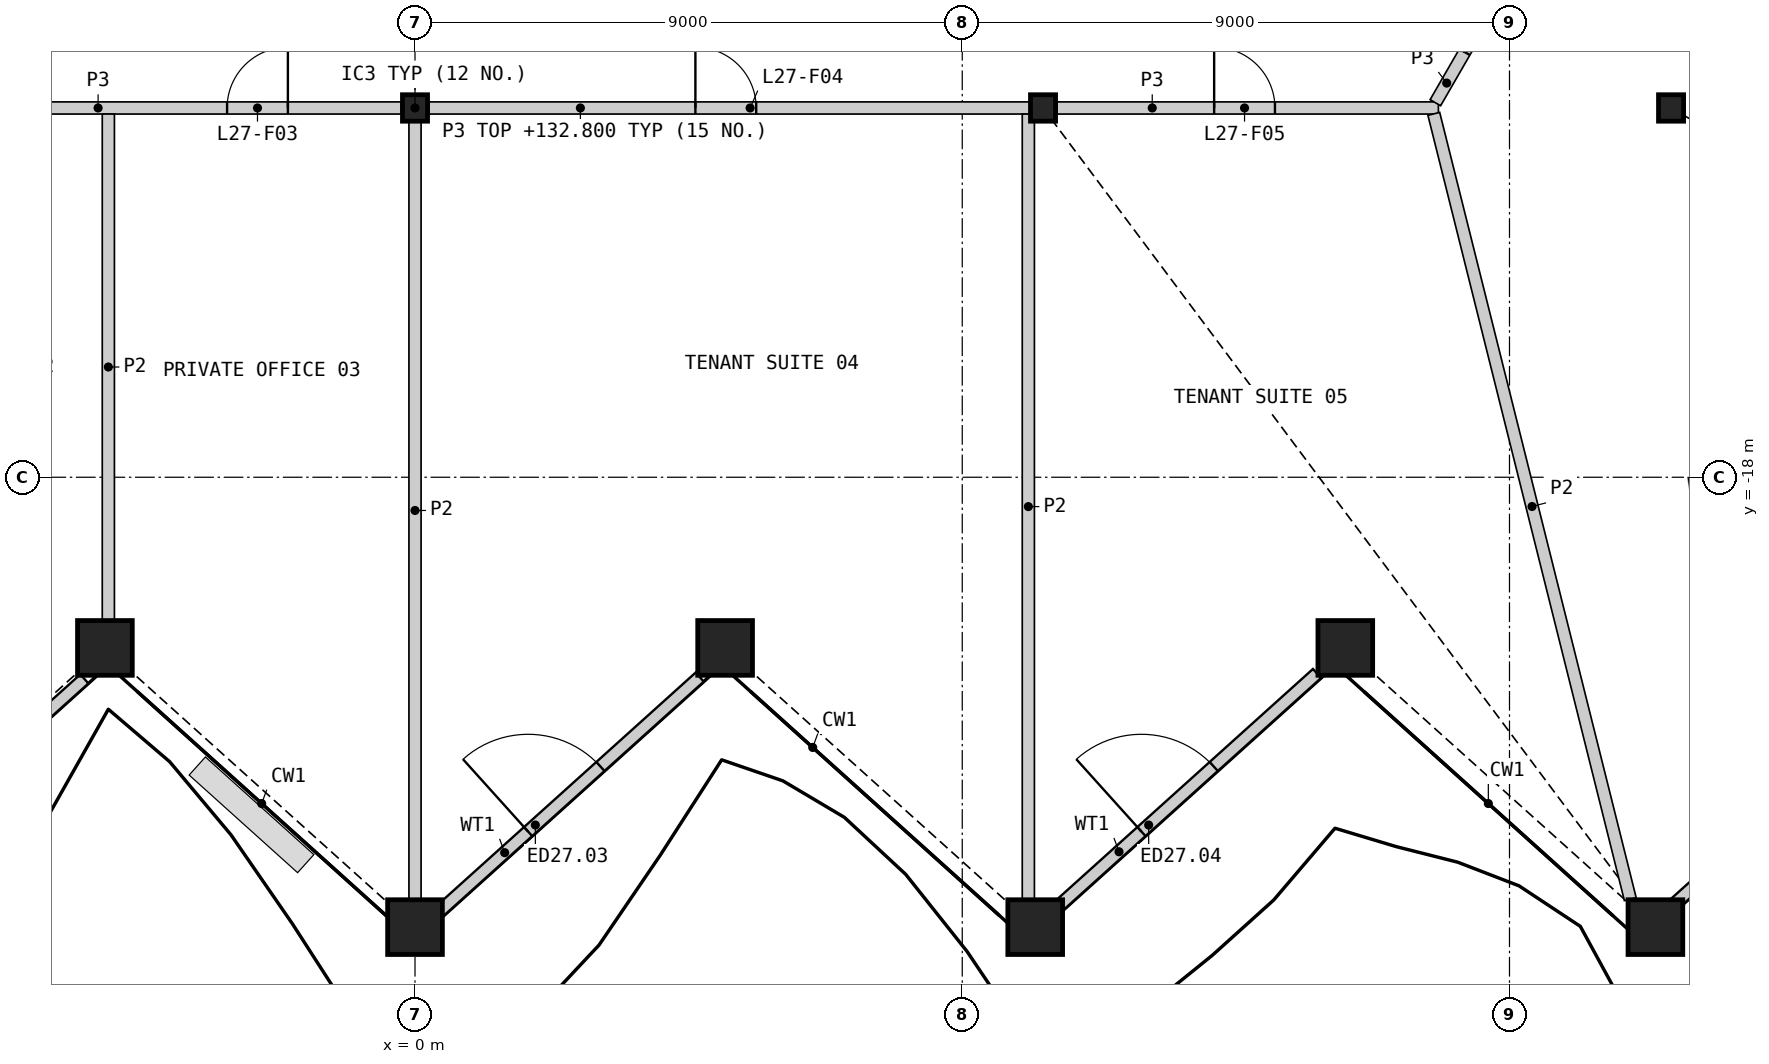
"""IFC4 building model, lengths in metres.
Left out: names, types, materials, properties, quantities, classifications, styles, units other than length and angle.
Written with IfcOpenShell. Run it as: python <this file> out.ifc"""

import sys

from ifc_helpers import new_model, si_unit, direction, frame, frame_2d, origin, origin_2d, place, context, subcontext, project, spatial, rectangle, hollow_rectangle, i_section, extrude, element, fill, save


model = new_model("IFC4")
c1 = context("Model", 3, precision=1e-05, world=origin(), true_north=direction((0.0, 1.0)))
c2 = subcontext(c1, "Body", "Model", "MODEL_VIEW")
j1 = project(units=[si_unit("LENGTHUNIT", "METRE"), si_unit("PLANEANGLEUNIT", "RADIAN")], contexts=[c1])
p1 = place(None, origin())
s1 = spatial("IfcSite", under=j1, at=p1, CompositionType="ELEMENT")
p2 = place(p1, origin())
s2 = spatial("IfcBuilding", under=s1, at=p2, CompositionType="ELEMENT")
p3 = place(p2, frame((0.0, 0.0, 129.0)))
s3 = spatial("IfcBuildingStorey", under=s2, at=p3, CompositionType="ELEMENT", Elevation=129.0)
for number, where, z_axis, x_axis in (
    (1, (-5.1, -20.807, 0.0), (0.0, 0.0, 1.0), (1.0, 0.0, 0.0)),
    (2, (0.0, -25.399, 0.0), (0.0, 0.0, 1.0), (1.0, 0.0, 0.0)),
    (3, (5.1, -20.807, 0.0), (0.0, 0.0, 1.0), (1.0, 0.0, 0.0)),
    (4, (10.2, -25.399, 0.0), (0.0, 0.0, 1.0), (1.0, 0.0, 0.0)),
    (5, (15.3, -20.807, 0.0), (0.0, 0.0, 1.0), (1.0, 0.0, 0.0)),
    (6, (20.4, -25.399, 0.0), (0.0, 0.0, 1.0), (1.0, 0.0, 0.0)),
):
    element("IfcColumn", number, at=place(p3, frame(where, z_axis=z_axis, x_axis=x_axis)), inside=s3, PredefinedType="COLUMN", context=c2, shape_type="SweptSolid", body=[
        extrude(hollow_rectangle(XDim=0.9, YDim=0.9, WallThickness=0.06, at=origin_2d()), origin(), (0.0, 0.0, 1.0), 4.2),
    ])
for number, where, z_axis, x_axis in (
    (7, (0.0, -11.926, 0.0), (0.0, 0.0, 1.0), (1.0, 0.0, 0.0)),
    (8, (10.328, -11.926, 0.0), (0.0, 0.0, 1.0), (1.0, 0.0, 0.0)),
    (9, (20.657, -11.926, 0.0), (0.0, 0.0, 1.0), (1.0, 0.0, 0.0)),
):
    element("IfcColumn", number, at=place(p3, frame(where, z_axis=z_axis, x_axis=x_axis)), inside=s3, PredefinedType="COLUMN", context=c2, shape_type="SweptSolid", body=[
        extrude(i_section(OverallWidth=0.412, OverallDepth=0.435, WebThickness=0.036, FlangeThickness=0.057, at=origin_2d()), origin(), (0.0, 0.0, 1.0), 4.2),
    ])
p4 = place(p3, frame((-9.696, -25.151, 0.0), z_axis=(0.0, 0.0, 1.0), x_axis=(0.743141591148, 0.669134198428, 0.0)))
e10 = element("IfcWall", 10, at=p4, inside=s3, PredefinedType="SOLIDWALL", context=c2, shape_type="SweptSolid", body=[
    extrude(rectangle(XDim=5.73, YDim=0.2, at=frame_2d((2.865, 0.0))), origin(), (0.0, 0.0, 1.0), 3.189),
])
p5 = place(p4, frame((1.978, 0.0, 0.0)))
e11 = element("IfcOpeningElement", 11, at=p5, cuts=e10, PredefinedType="OPENING", context=c2, shape_type="SweptSolid", body=[
    extrude(rectangle(XDim=1.6, YDim=2.4, at=frame_2d((0.8, 1.2))), frame((0.0, 0.11, 0.0), z_axis=(0.0, -1.0, 0.0), x_axis=(1.0, 0.0, 0.0)), (0.0, 0.0, 1.0), 0.22),
])
p6 = place(p3, frame((0.406, -25.137, 0.0), z_axis=(0.0, 0.0, 1.0), x_axis=(0.743135897471, 0.669140521782, 0.0)))
e12 = element("IfcWall", 12, at=p6, inside=s3, PredefinedType="SOLIDWALL", context=c2, shape_type="SweptSolid", body=[
    extrude(rectangle(XDim=5.754, YDim=0.2, at=frame_2d((2.877, 0.0))), origin(), (0.0, 0.0, 1.0), 3.189),
])
p7 = place(p6, frame((1.957, 0.0, 0.0)))
e13 = element("IfcOpeningElement", 13, at=p7, cuts=e12, PredefinedType="OPENING", context=c2, shape_type="SweptSolid", body=[
    extrude(rectangle(XDim=1.6, YDim=2.4, at=frame_2d((0.8, 1.2))), frame((0.0, 0.11, 0.0), z_axis=(0.0, -1.0, 0.0), x_axis=(1.0, 0.0, 0.0)), (0.0, 0.0, 1.0), 0.22),
])
p8 = place(p3, frame((10.492, -25.137, 0.0), z_axis=(0.0, 0.0, 1.0), x_axis=(0.743136230799, 0.669140151593, 0.0)))
e14 = element("IfcWall", 14, at=p8, inside=s3, PredefinedType="SOLIDWALL", context=c2, shape_type="SweptSolid", body=[
    extrude(rectangle(XDim=5.843, YDim=0.2, at=frame_2d((2.922, 0.0))), origin(), (0.0, 0.0, 1.0), 3.189),
])
p9 = place(p8, frame((1.957, 0.0, 0.0)))
e15 = element("IfcOpeningElement", 15, at=p9, cuts=e14, PredefinedType="OPENING", context=c2, shape_type="SweptSolid", body=[
    extrude(rectangle(XDim=1.6, YDim=2.4, at=frame_2d((0.8, 1.2))), frame((0.0, 0.11, 0.0), z_axis=(0.0, -1.0, 0.0), x_axis=(1.0, 0.0, 0.0)), (0.0, 0.0, 1.0), 0.22),
])
p10 = place(p3, frame((20.579, -25.137, 0.0), z_axis=(0.0, 0.0, 1.0), x_axis=(0.743148838472, 0.66912614945, 0.0)))
e16 = element("IfcWall", 16, at=p10, inside=s3, PredefinedType="SOLIDWALL", context=c2, shape_type="SweptSolid", body=[
    extrude(rectangle(XDim=5.515, YDim=0.2, at=frame_2d((2.757, 0.0))), origin(), (0.0, 0.0, 1.0), 3.189),
])
p11 = place(p10, frame((1.957, 0.0, 0.0)))
e17 = element("IfcOpeningElement", 17, at=p11, cuts=e16, PredefinedType="OPENING", context=c2, shape_type="SweptSolid", body=[
    extrude(rectangle(XDim=1.6, YDim=2.4, at=frame_2d((0.8, 1.2))), frame((0.0, 0.11, 0.0), z_axis=(0.0, -1.0, 0.0), x_axis=(1.0, 0.0, 0.0)), (0.0, 0.0, 1.0), 0.22),
])
p12 = place(p3, frame((0.227, -11.926, 0.0), z_axis=(0.0, 0.0, 1.0), x_axis=(1.0, 0.0, 0.0)))
e18 = element("IfcWall", 18, at=p12, inside=s3, PredefinedType="PARTITIONING", context=c2, shape_type="SweptSolid", body=[
    extrude(rectangle(XDim=9.969, YDim=0.2, at=frame_2d((4.985, 0.0))), origin(), (0.0, 0.0, 1.0), 3.8),
])
p13 = place(p12, frame((4.384, 0.0, 0.0)))
e19 = element("IfcOpeningElement", 19, at=p13, cuts=e18, PredefinedType="OPENING", context=c2, shape_type="SweptSolid", body=[
    extrude(rectangle(XDim=1.0, YDim=2.1, at=frame_2d((0.5, 1.05))), frame((0.0, 0.11, 0.0), z_axis=(0.0, -1.0, 0.0), x_axis=(1.0, 0.0, 0.0)), (0.0, 0.0, 1.0), 0.22),
])
p14 = place(p3, frame((-10.197, -11.926, 0.0), z_axis=(0.0, 0.0, 1.0), x_axis=(1.0, 0.0, 0.0)))
e20 = element("IfcWall", 20, at=p14, inside=s3, PredefinedType="PARTITIONING", context=c2, shape_type="SweptSolid", body=[
    extrude(rectangle(XDim=9.969, YDim=0.2, at=frame_2d((4.985, 0.0))), origin(), (0.0, 0.0, 1.0), 3.8),
])
p15 = place(p14, frame((2.166, 0.0, 0.0)))
e21 = element("IfcOpeningElement", 21, at=p15, cuts=e20, PredefinedType="OPENING", context=c2, shape_type="SweptSolid", body=[
    extrude(rectangle(XDim=1.0, YDim=2.1, at=frame_2d((0.5, 1.05))), frame((0.0, 0.11, 0.0), z_axis=(0.0, -1.0, 0.0), x_axis=(1.0, 0.0, 0.0)), (0.0, 0.0, 1.0), 0.22),
])
p16 = place(p14, frame((7.106, 0.0, 0.0)))
e22 = element("IfcOpeningElement", 22, at=p16, cuts=e20, PredefinedType="OPENING", context=c2, shape_type="SweptSolid", body=[
    extrude(rectangle(XDim=1.0, YDim=2.1, at=frame_2d((0.5, 1.05))), frame((0.0, 0.11, 0.0), z_axis=(0.0, -1.0, 0.0), x_axis=(1.0, 0.0, 0.0)), (0.0, 0.0, 1.0), 0.22),
])
p17 = place(p3, frame((10.556, -11.926, 0.0), z_axis=(0.0, 0.0, 1.0), x_axis=(1.0, 0.0, 0.0)))
e23 = element("IfcWall", 23, at=p17, inside=s3, PredefinedType="PARTITIONING", context=c2, shape_type="SweptSolid", body=[
    extrude(rectangle(XDim=6.275, YDim=0.2, at=frame_2d((3.137, 0.0))), origin(), (0.0, 0.0, 1.0), 3.8),
])
p18 = place(p17, frame((2.587, 0.0, 0.0)))
e24 = element("IfcOpeningElement", 24, at=p18, cuts=e23, PredefinedType="OPENING", context=c2, shape_type="SweptSolid", body=[
    extrude(rectangle(XDim=1.0, YDim=2.1, at=frame_2d((0.5, 1.05))), frame((0.0, 0.11, 0.0), z_axis=(0.0, -1.0, 0.0), x_axis=(1.0, 0.0, 0.0)), (0.0, 0.0, 1.0), 0.22),
])
p19 = place(p3, frame((16.781, -11.84, 0.0), z_axis=(0.0, 0.0, 1.0), x_axis=(0.499958791762, 0.866049194065, 0.0)))
e25 = element("IfcWall", 25, at=p19, inside=s3, PredefinedType="PARTITIONING", context=c2, shape_type="SweptSolid", body=[
    extrude(rectangle(XDim=3.726, YDim=0.2, at=frame_2d((1.863, 0.0))), origin(), (0.0, 0.0, 1.0), 3.8),
])
p20 = place(p19, frame((0.963, 0.0, 0.0)))
e26 = element("IfcOpeningElement", 26, at=p20, cuts=e25, PredefinedType="OPENING", context=c2, shape_type="SweptSolid", body=[
    extrude(rectangle(XDim=1.8, YDim=2.1, at=frame_2d((0.9, 1.05))), frame((0.0, 0.11, 0.0), z_axis=(0.0, -1.0, 0.0), x_axis=(1.0, 0.0, 0.0)), (0.0, 0.0, 1.0), 0.22),
])
p21 = place(p3, frame((16.755, -12.023, 0.0), z_axis=(0.0, 0.0, 1.0), x_axis=(0.242708204495, -0.97009933897, 0.0)))
e27 = element("IfcWall", 27, at=p21, inside=s3, PredefinedType="PARTITIONING", context=c2, shape_type="SweptSolid", body=[
    extrude(rectangle(XDim=13.314, YDim=0.2, at=frame_2d((6.657, 0.0))), origin(), (0.0, 0.0, 1.0), 2.885),
])
p22 = place(p3, frame((10.087, -24.939, 0.0), z_axis=(0.0, 0.0, 1.0), x_axis=(0.0, 1.0, 0.0)))
e28 = element("IfcWall", 28, at=p22, inside=s3, PredefinedType="PARTITIONING", context=c2, shape_type="SweptSolid", body=[
    extrude(rectangle(XDim=12.913, YDim=0.2, at=frame_2d((6.457, 0.0))), origin(), (0.0, 0.0, 1.0), 2.885),
])
p23 = place(p3, frame((0.0, -24.939, 0.0), z_axis=(0.0, 0.0, 1.0), x_axis=(0.0, 1.0, 0.0)))
e29 = element("IfcWall", 29, at=p23, inside=s3, PredefinedType="PARTITIONING", context=c2, shape_type="SweptSolid", body=[
    extrude(rectangle(XDim=12.785, YDim=0.2, at=frame_2d((6.393, 0.0))), origin(), (0.0, 0.0, 1.0), 2.885),
])
p24 = place(p3, frame((-5.043, -20.347, 0.0), z_axis=(0.0, 0.0, 1.0), x_axis=(0.0, 1.0, 0.0)))
e30 = element("IfcWall", 30, at=p24, inside=s3, PredefinedType="PARTITIONING", context=c2, shape_type="SweptSolid", body=[
    extrude(rectangle(XDim=8.321, YDim=0.2, at=frame_2d((4.16, 0.0))), origin(), (0.0, 0.0, 1.0), 2.885),
])
p25 = place(p7, origin())
e31 = element("IfcDoor", 31, at=p25, inside=s3, OperationType="DOUBLE_DOOR_SINGLE_SWING", PredefinedType="DOOR", context=c2, shape_type="SweptSolid", body=[
    extrude(rectangle(XDim=1.6, YDim=2.4, at=frame_2d((0.8, 1.2))), frame((0.0, 0.025, 0.0), z_axis=(0.0, -1.0, 0.0), x_axis=(1.0, 0.0, 0.0)), (0.0, 0.0, 1.0), 0.05),
])
fill(e13, e31)
p26 = place(p9, origin())
e32 = element("IfcDoor", 32, at=p26, inside=s3, OperationType="DOUBLE_DOOR_SINGLE_SWING", PredefinedType="DOOR", context=c2, shape_type="SweptSolid", body=[
    extrude(rectangle(XDim=1.6, YDim=2.4, at=frame_2d((0.8, 1.2))), frame((0.0, 0.025, 0.0), z_axis=(0.0, -1.0, 0.0), x_axis=(1.0, 0.0, 0.0)), (0.0, 0.0, 1.0), 0.05),
])
fill(e15, e32)
p27 = place(p16, origin())
e33 = element("IfcDoor", 33, at=p27, inside=s3, OperationType="SINGLE_SWING_RIGHT", PredefinedType="DOOR", context=c2, shape_type="SweptSolid", body=[
    extrude(rectangle(XDim=1.0, YDim=2.1, at=frame_2d((0.5, 1.05))), frame((0.0, 0.025, 0.0), z_axis=(0.0, -1.0, 0.0), x_axis=(1.0, 0.0, 0.0)), (0.0, 0.0, 1.0), 0.05),
])
fill(e22, e33)
p28 = place(p13, origin())
e34 = element("IfcDoor", 34, at=p28, inside=s3, OperationType="SINGLE_SWING_LEFT", PredefinedType="DOOR", context=c2, shape_type="SweptSolid", body=[
    extrude(rectangle(XDim=1.0, YDim=2.1, at=frame_2d((0.5, 1.05))), frame((0.0, 0.025, 0.0), z_axis=(0.0, -1.0, 0.0), x_axis=(1.0, 0.0, 0.0)), (0.0, 0.0, 1.0), 0.05),
])
fill(e19, e34)
p29 = place(p18, origin())
e35 = element("IfcDoor", 35, at=p29, inside=s3, OperationType="SINGLE_SWING_LEFT", PredefinedType="DOOR", context=c2, shape_type="SweptSolid", body=[
    extrude(rectangle(XDim=1.0, YDim=2.1, at=frame_2d((0.5, 1.05))), frame((0.0, 0.025, 0.0), z_axis=(0.0, -1.0, 0.0), x_axis=(1.0, 0.0, 0.0)), (0.0, 0.0, 1.0), 0.05),
])
fill(e24, e35)
p30 = place(p20, origin())
e36 = element("IfcDoor", 36, at=p30, inside=s3, OperationType="DOUBLE_DOOR_SINGLE_SWING", PredefinedType="DOOR", context=c2, shape_type="SweptSolid", body=[
    extrude(rectangle(XDim=1.8, YDim=2.1, at=frame_2d((0.9, 1.05))), frame((0.0, 0.025, 0.0), z_axis=(0.0, -1.0, 0.0), x_axis=(1.0, 0.0, 0.0)), (0.0, 0.0, 1.0), 0.05),
])
fill(e26, e36)
save(model, sys.argv[1])
